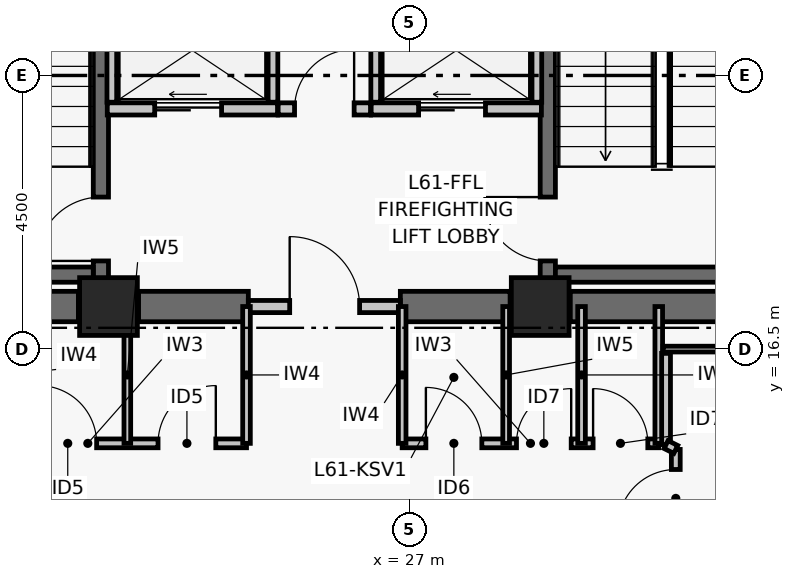
"""IFC4 building model, lengths in metres.
Left out: names, types, materials, properties, quantities, classifications, styles, units other than length and angle.
Written with IfcOpenShell. Run it as: python <this file> out.ifc"""

import sys

from ifc_helpers import new_model, si_unit, direction, frame, frame_2d, origin, origin_2d, place, context, subcontext, project, spatial, rectangle, extrude, element, fill, save


model = new_model("IFC4")
c1 = context("Model", 3, precision=1e-05, world=origin(), true_north=direction((0.0, 1.0)))
c2 = subcontext(c1, "Body", "Model", "MODEL_VIEW")
j1 = project(units=[si_unit("LENGTHUNIT", "METRE"), si_unit("PLANEANGLEUNIT", "RADIAN")], contexts=[c1])
p1 = place(None, origin())
s1 = spatial("IfcSite", under=j1, at=p1, CompositionType="ELEMENT")
p2 = place(p1, origin())
s2 = spatial("IfcBuilding", under=s1, at=p2, CompositionType="ELEMENT")
p3 = place(p2, frame((0.0, 0.0, 242.64)))
s3 = spatial("IfcBuildingStorey", under=s2, at=p3, CompositionType="ELEMENT", Elevation=242.64)
for number, where, z_axis, x_axis in (
    (1, (22.05, 17.2, 0.0), (0.0, 0.0, 1.0), (1.0, 0.0, 0.0)),
    (2, (29.15, 17.2, 0.0), (0.0, 0.0, 1.0), (1.0, 0.0, 0.0)),
):
    element("IfcColumn", number, at=place(p3, frame(where, z_axis=z_axis, x_axis=x_axis)), inside=s3, PredefinedType="COLUMN", context=c2, shape_type="SweptSolid", body=[
        extrude(rectangle(XDim=0.95, YDim=0.95, at=origin_2d()), origin(), (0.0, 0.0, 1.0), 4.5),
    ])
p4 = place(p3, frame((18.295, 17.2, 0.0), z_axis=(0.0, 0.0, 1.0), x_axis=(1.0, 0.0, 0.0)))
e3 = element("IfcWall", 3, at=p4, inside=s3, PredefinedType="SHEAR", context=c2, shape_type="SweptSolid", body=[
    extrude(rectangle(XDim=3.26, YDim=0.5, at=frame_2d((1.63, 0.0))), origin(), (0.0, 0.0, 1.0), 4.28),
])
p5 = place(p3, frame((22.545, 17.2, 0.0), z_axis=(0.0, 0.0, 1.0), x_axis=(1.0, 0.0, 0.0)))
e4 = element("IfcWall", 4, at=p5, inside=s3, PredefinedType="SHEAR", context=c2, shape_type="SweptSolid", body=[
    extrude(rectangle(XDim=1.805, YDim=0.5, at=frame_2d((0.903, 0.0))), origin(), (0.0, 0.0, 1.0), 4.28),
])
p6 = place(p3, frame((26.85, 17.2, 0.0), z_axis=(0.0, 0.0, 1.0), x_axis=(1.0, 0.0, 0.0)))
e5 = element("IfcWall", 5, at=p6, inside=s3, PredefinedType="SHEAR", context=c2, shape_type="SweptSolid", body=[
    extrude(rectangle(XDim=1.805, YDim=0.5, at=frame_2d((0.902, 0.0))), origin(), (0.0, 0.0, 1.0), 4.28),
])
p7 = place(p3, frame((29.645, 17.2, 0.0), z_axis=(0.0, 0.0, 1.0), x_axis=(1.0, 0.0, 0.0)))
e6 = element("IfcWall", 6, at=p7, inside=s3, PredefinedType="SHEAR", context=c2, shape_type="SweptSolid", body=[
    extrude(rectangle(XDim=3.26, YDim=0.5, at=frame_2d((1.63, 0.0))), origin(), (0.0, 0.0, 1.0), 4.28),
])
p8 = place(p3, frame((21.925, 17.6, 0.0), z_axis=(0.0, 0.0, 1.0), x_axis=(0.0, 1.0, 0.0)))
e7 = element("IfcWall", 7, at=p8, inside=s3, PredefinedType="SHEAR", context=c2, shape_type="SweptSolid", body=[
    extrude(rectangle(XDim=8.8, YDim=0.25, at=frame_2d((4.4, 0.0))), origin(), (0.0, 0.0, 1.0), 4.28),
])
p9 = place(p8, frame((0.35, 0.0, 0.0)))
e8 = element("IfcOpeningElement", 8, at=p9, cuts=e7, PredefinedType="OPENING", context=c2, shape_type="SweptSolid", body=[
    extrude(rectangle(XDim=1.05, YDim=2.08, at=frame_2d((0.525, 1.04))), frame((0.0, 0.135, 0.0), z_axis=(0.0, -1.0, 0.0), x_axis=(1.0, 0.0, 0.0)), (0.0, 0.0, 1.0), 0.27),
])
p10 = place(p3, frame((18.304, 17.725, 0.0), z_axis=(0.0, 0.0, 1.0), x_axis=(1.0, 0.0, 0.0)))
e9 = element("IfcWall", 9, at=p10, inside=s3, PredefinedType="SHEAR", context=c2, shape_type="SweptSolid", body=[
    extrude(rectangle(XDim=3.496, YDim=0.25, at=frame_2d((1.748, 0.0))), origin(), (0.0, 0.0, 1.0), 4.28),
])
p11 = place(p3, frame((29.275, 17.6, 0.0), z_axis=(0.0, 0.0, 1.0), x_axis=(0.0, 1.0, 0.0)))
e10 = element("IfcWall", 10, at=p11, inside=s3, PredefinedType="SHEAR", context=c2, shape_type="SweptSolid", body=[
    extrude(rectangle(XDim=8.8, YDim=0.25, at=frame_2d((4.4, 0.0))), origin(), (0.0, 0.0, 1.0), 4.28),
])
p12 = place(p11, frame((0.35, 0.0, 0.0)))
e11 = element("IfcOpeningElement", 11, at=p12, cuts=e10, PredefinedType="OPENING", context=c2, shape_type="SweptSolid", body=[
    extrude(rectangle(XDim=1.05, YDim=2.08, at=frame_2d((0.525, 1.04))), frame((0.0, 0.135, 0.0), z_axis=(0.0, -1.0, 0.0), x_axis=(1.0, 0.0, 0.0)), (0.0, 0.0, 1.0), 0.27),
])
p13 = place(p3, frame((29.4, 17.725, 0.0), z_axis=(0.0, 0.0, 1.0), x_axis=(1.0, 0.0, 0.0)))
e12 = element("IfcWall", 12, at=p13, inside=s3, PredefinedType="SHEAR", context=c2, shape_type="SweptSolid", body=[
    extrude(rectangle(XDim=3.496, YDim=0.25, at=frame_2d((1.748, 0.0))), origin(), (0.0, 0.0, 1.0), 4.28),
])
p14 = place(p3, frame((24.35, 17.2, 0.0), z_axis=(0.0, 0.0, 1.0), x_axis=(1.0, 0.0, 0.0)))
e13 = element("IfcWall", 13, at=p14, inside=s3, PredefinedType="PARTITIONING", context=c2, shape_type="SweptSolid", body=[
    extrude(rectangle(XDim=2.5, YDim=0.2, at=frame_2d((1.25, 0.0))), origin(), (0.0, 0.0, 1.0), 3.41),
])
p15 = place(p14, frame((0.68, 0.0, 0.0)))
e14 = element("IfcOpeningElement", 14, at=p15, cuts=e13, PredefinedType="OPENING", context=c2, shape_type="SweptSolid", body=[
    extrude(rectangle(XDim=1.15, YDim=2.08, at=frame_2d((0.575, 1.04))), frame((0.0, 0.11, 0.0), z_axis=(0.0, -1.0, 0.0), x_axis=(1.0, 0.0, 0.0)), (0.0, 0.0, 1.0), 0.22),
])
p16 = place(p3, frame((24.84, 20.45, 0.0), z_axis=(0.0, 0.0, 1.0), x_axis=(1.0, 0.0, 0.0)))
e15 = element("IfcWall", 15, at=p16, inside=s3, PredefinedType="PARTITIONING", context=c2, shape_type="SweptSolid", body=[
    extrude(rectangle(XDim=1.52, YDim=0.2, at=frame_2d((0.76, 0.0))), origin(), (0.0, 0.0, 1.0), 4.28),
])
p17 = place(p16, frame((0.27, 0.0, 0.0)))
e16 = element("IfcOpeningElement", 16, at=p17, cuts=e15, PredefinedType="OPENING", context=c2, shape_type="SweptSolid", body=[
    extrude(rectangle(XDim=0.98, YDim=2.06, at=frame_2d((0.49, 1.03))), frame((0.0, 0.11, 0.0), z_axis=(0.0, -1.0, 0.0), x_axis=(1.0, 0.0, 0.0)), (0.0, 0.0, 1.0), 0.22),
])
p18 = place(p3, frame((22.03, 20.45, 0.0), z_axis=(0.0, 0.0, 1.0), x_axis=(1.0, 0.0, 0.0)))
e17 = element("IfcWall", 17, at=p18, inside=s3, PredefinedType="PARTITIONING", context=c2, shape_type="SweptSolid", body=[
    extrude(rectangle(XDim=2.8, YDim=0.2, at=frame_2d((1.4, 0.0))), origin(), (0.0, 0.0, 1.0), 4.28),
])
p19 = place(p18, frame((0.78, 0.0, 0.0)))
e18 = element("IfcOpeningElement", 18, at=p19, cuts=e17, PredefinedType="OPENING", context=c2, shape_type="SweptSolid", body=[
    extrude(rectangle(XDim=1.1, YDim=2.08, at=frame_2d((0.55, 1.04))), frame((0.0, 0.11, 0.0), z_axis=(0.0, -1.0, 0.0), x_axis=(1.0, 0.0, 0.0)), (0.0, 0.0, 1.0), 0.22),
])
p20 = place(p3, frame((26.37, 20.45, 0.0), z_axis=(0.0, 0.0, 1.0), x_axis=(1.0, 0.0, 0.0)))
e19 = element("IfcWall", 19, at=p20, inside=s3, PredefinedType="PARTITIONING", context=c2, shape_type="SweptSolid", body=[
    extrude(rectangle(XDim=2.8, YDim=0.2, at=frame_2d((1.4, 0.0))), origin(), (0.0, 0.0, 1.0), 4.28),
])
p21 = place(p20, frame((0.78, 0.0, 0.0)))
e20 = element("IfcOpeningElement", 20, at=p21, cuts=e19, PredefinedType="OPENING", context=c2, shape_type="SweptSolid", body=[
    extrude(rectangle(XDim=1.1, YDim=2.08, at=frame_2d((0.55, 1.04))), frame((0.0, 0.11, 0.0), z_axis=(0.0, -1.0, 0.0), x_axis=(1.0, 0.0, 0.0)), (0.0, 0.0, 1.0), 0.22),
])
for number, where, z_axis, x_axis in (
    (21, (22.105, 20.56, 0.0), (0.0, 0.0, 1.0), (0.0, 1.0, 0.0)),
    (22, (24.755, 20.56, 0.0), (0.0, 0.0, 1.0), (0.0, 1.0, 0.0)),
):
    element("IfcWall", number, at=place(p3, frame(where, z_axis=z_axis, x_axis=x_axis)), inside=s3, PredefinedType="PARTITIONING", context=c2, shape_type="SweptSolid", body=[
        extrude(rectangle(XDim=1.71, YDim=0.16, at=frame_2d((0.855, 0.0))), origin(), (0.0, 0.0, 1.0), 4.28),
    ])
p22 = place(p3, frame((29.095, 20.56, 0.0), z_axis=(0.0, 0.0, 1.0), x_axis=(0.0, 1.0, 0.0)))
e23 = element("IfcWall", 23, at=p22, inside=s3, PredefinedType="PARTITIONING", context=c2, shape_type="SweptSolid", body=[
    extrude(rectangle(XDim=3.58, YDim=0.16, at=frame_2d((1.79, 0.0))), origin(), (0.0, 0.0, 1.0), 4.28),
])
p23 = place(p3, frame((26.445, 20.56, 0.0), z_axis=(0.0, 0.0, 1.0), x_axis=(0.0, 1.0, 0.0)))
e24 = element("IfcWall", 24, at=p23, inside=s3, PredefinedType="PARTITIONING", context=c2, shape_type="SweptSolid", body=[
    extrude(rectangle(XDim=1.71, YDim=0.16, at=frame_2d((0.855, 0.0))), origin(), (0.0, 0.0, 1.0), 4.28),
])
p24 = place(p3, frame((19.1, 14.95, 0.0), z_axis=(0.0, 0.0, 1.0), x_axis=(1.0, 0.0, 0.0)))
e25 = element("IfcWall", 25, at=p24, inside=s3, PredefinedType="PARTITIONING", context=c2, shape_type="SweptSolid", body=[
    extrude(rectangle(XDim=5.22, YDim=0.145, at=frame_2d((2.61, 0.0))), origin(), (0.0, 0.0, 1.0), 3.56),
])
p25 = place(p24, frame((0.2, 0.0, 0.0)))
e26 = element("IfcOpeningElement", 26, at=p25, cuts=e25, PredefinedType="OPENING", context=c2, shape_type="SweptSolid", body=[
    extrude(rectangle(XDim=0.9, YDim=2.02, at=frame_2d((0.45, 1.01))), frame((0.0, 0.083, 0.0), z_axis=(0.0, -1.0, 0.0), x_axis=(1.0, 0.0, 0.0)), (0.0, 0.0, 1.0), 0.165),
])
p26 = place(p24, frame((1.805, 0.0, 0.0)))
e27 = element("IfcOpeningElement", 27, at=p26, cuts=e25, PredefinedType="OPENING", context=c2, shape_type="SweptSolid", body=[
    extrude(rectangle(XDim=0.95, YDim=2.06, at=frame_2d((0.475, 1.03))), frame((0.0, 0.083, 0.0), z_axis=(0.0, -1.0, 0.0), x_axis=(1.0, 0.0, 0.0)), (0.0, 0.0, 1.0), 0.165),
])
p27 = place(p24, frame((3.765, 0.0, 0.0)))
e28 = element("IfcOpeningElement", 28, at=p27, cuts=e25, PredefinedType="OPENING", context=c2, shape_type="SweptSolid", body=[
    extrude(rectangle(XDim=0.95, YDim=2.06, at=frame_2d((0.475, 1.03))), frame((0.0, 0.083, 0.0), z_axis=(0.0, -1.0, 0.0), x_axis=(1.0, 0.0, 0.0)), (0.0, 0.0, 1.0), 0.165),
])
p28 = place(p3, frame((26.88, 14.95, 0.0), z_axis=(0.0, 0.0, 1.0), x_axis=(1.0, 0.0, 0.0)))
e29 = element("IfcWall", 29, at=p28, inside=s3, PredefinedType="PARTITIONING", context=c2, shape_type="SweptSolid", body=[
    extrude(rectangle(XDim=4.22, YDim=0.145, at=frame_2d((2.11, 0.0))), origin(), (0.0, 0.0, 1.0), 3.76),
])
p29 = place(p28, frame((0.39, 0.0, 0.0)))
e30 = element("IfcOpeningElement", 30, at=p29, cuts=e29, PredefinedType="OPENING", context=c2, shape_type="SweptSolid", body=[
    extrude(rectangle(XDim=0.92, YDim=2.05, at=frame_2d((0.46, 1.025))), frame((0.0, 0.083, 0.0), z_axis=(0.0, -1.0, 0.0), x_axis=(1.0, 0.0, 0.0)), (0.0, 0.0, 1.0), 0.165),
])
p30 = place(p28, frame((1.88, 0.0, 0.0)))
e31 = element("IfcOpeningElement", 31, at=p30, cuts=e29, PredefinedType="OPENING", context=c2, shape_type="SweptSolid", body=[
    extrude(rectangle(XDim=0.9, YDim=2.02, at=frame_2d((0.45, 1.01))), frame((0.0, 0.083, 0.0), z_axis=(0.0, -1.0, 0.0), x_axis=(1.0, 0.0, 0.0)), (0.0, 0.0, 1.0), 0.165),
])
p31 = place(p28, frame((3.14, 0.0, 0.0)))
e32 = element("IfcOpeningElement", 32, at=p31, cuts=e29, PredefinedType="OPENING", context=c2, shape_type="SweptSolid", body=[
    extrude(rectangle(XDim=0.9, YDim=2.02, at=frame_2d((0.45, 1.01))), frame((0.0, 0.083, 0.0), z_axis=(0.0, -1.0, 0.0), x_axis=(1.0, 0.0, 0.0)), (0.0, 0.0, 1.0), 0.165),
])
p32 = place(p3, frame((22.36, 14.95, 0.0), z_axis=(0.0, 0.0, 1.0), x_axis=(0.0, 1.0, 0.0)))
e33 = element("IfcWall", 33, at=p32, inside=s3, PredefinedType="PARTITIONING", context=c2, shape_type="SweptSolid", body=[
    extrude(rectangle(XDim=2.25, YDim=0.11, at=frame_2d((1.125, 0.0))), origin(), (0.0, 0.0, 1.0), 3.41),
])
for number, where, z_axis, x_axis in (
    (34, (24.32, 14.95, 0.0), (0.0, 0.0, 1.0), (0.0, 1.0, 0.0)),
    (35, (26.88, 14.95, 0.0), (0.0, 0.0, 1.0), (0.0, 1.0, 0.0)),
):
    element("IfcWall", number, at=place(p3, frame(where, z_axis=z_axis, x_axis=x_axis)), inside=s3, PredefinedType="PARTITIONING", context=c2, shape_type="SweptSolid", body=[
        extrude(rectangle(XDim=2.25, YDim=0.125, at=frame_2d((1.125, 0.0))), origin(), (0.0, 0.0, 1.0), 3.41),
    ])
p33 = place(p3, frame((28.59, 14.95, 0.0), z_axis=(0.0, 0.0, 1.0), x_axis=(0.0, 1.0, 0.0)))
e36 = element("IfcWall", 36, at=p33, inside=s3, PredefinedType="PARTITIONING", context=c2, shape_type="SweptSolid", body=[
    extrude(rectangle(XDim=2.25, YDim=0.11, at=frame_2d((1.125, 0.0))), origin(), (0.0, 0.0, 1.0), 3.41),
])
for number, where, z_axis, x_axis in (
    (37, (29.83, 14.95, 0.0), (0.0, 0.0, 1.0), (0.0, 1.0, 0.0)),
    (38, (31.1, 14.95, 0.0), (0.0, 0.0, 1.0), (0.0, 1.0, 0.0)),
):
    element("IfcWall", number, at=place(p3, frame(where, z_axis=z_axis, x_axis=x_axis)), inside=s3, PredefinedType="PARTITIONING", context=c2, shape_type="SweptSolid", body=[
        extrude(rectangle(XDim=2.25, YDim=0.125, at=frame_2d((1.125, 0.0))), origin(), (0.0, 0.0, 1.0), 3.41),
    ])
p34 = place(p3, frame((31.38, 13.29, 0.0), z_axis=(0.0, 0.0, 1.0), x_axis=(0.0, 1.0, 0.0)))
e39 = element("IfcWall", 39, at=p34, inside=s3, PredefinedType="PARTITIONING", context=c2, shape_type="SweptSolid", body=[
    extrude(rectangle(XDim=1.56, YDim=0.145, at=frame_2d((0.78, 0.0))), origin(), (0.0, 0.0, 1.0), 4.28),
])
p35 = place(p34, frame((0.28, 0.0, 0.0)))
e40 = element("IfcOpeningElement", 40, at=p35, cuts=e39, PredefinedType="OPENING", context=c2, shape_type="SweptSolid", body=[
    extrude(rectangle(XDim=0.95, YDim=2.06, at=frame_2d((0.475, 1.03))), frame((0.0, 0.083, 0.0), z_axis=(0.0, -1.0, 0.0), x_axis=(1.0, 0.0, 0.0)), (0.0, 0.0, 1.0), 0.165),
])
p36 = place(p3, frame((31.22, 14.93, 0.0), z_axis=(0.0, 0.0, 1.0), x_axis=(0.0, 1.0, 0.0)))
e41 = element("IfcWall", 41, at=p36, inside=s3, PredefinedType="PARTITIONING", context=c2, shape_type="SweptSolid", body=[
    extrude(rectangle(XDim=1.5, YDim=0.145, at=frame_2d((0.75, 0.0))), origin(), (0.0, 0.0, 1.0), 3.76),
])
p37 = place(p3, frame((31.17, 16.5, 0.0), z_axis=(0.0, 0.0, 1.0), x_axis=(1.0, 0.0, 0.0)))
e42 = element("IfcWall", 42, at=p37, inside=s3, PredefinedType="PARTITIONING", context=c2, shape_type="SweptSolid", body=[
    extrude(rectangle(XDim=16.534, YDim=0.095, at=frame_2d((8.267, 0.0))), origin(), (0.0, 0.0, 1.0), 3.76),
])
p38 = place(p37, frame((7.807, 0.0, 0.0)))
e43 = element("IfcOpeningElement", 43, at=p38, cuts=e42, PredefinedType="OPENING", context=c2, shape_type="SweptSolid", body=[
    extrude(rectangle(XDim=0.92, YDim=2.05, at=frame_2d((0.46, 1.025))), frame((0.0, 0.057, 0.0), z_axis=(0.0, -1.0, 0.0), x_axis=(1.0, 0.0, 0.0)), (0.0, 0.0, 1.0), 0.115),
])
p39 = place(p3, frame((31.38, 14.85, 0.0), z_axis=(0.0, 0.0, 1.0), x_axis=(-0.89470021502, 0.446667130247, 0.0)))
e44 = element("IfcWall", 44, at=p39, inside=s3, PredefinedType="PARTITIONING", context=c2, shape_type="SweptSolid", body=[
    extrude(rectangle(XDim=0.179, YDim=0.145, at=frame_2d((0.089, 0.0))), origin(), (0.0, 0.0, 1.0), 4.28),
])
p40 = place(p9, origin())
e45 = element("IfcDoor", 45, at=p40, inside=s3, OperationType="SINGLE_SWING_LEFT", PredefinedType="DOOR", context=c2, shape_type="SweptSolid", body=[
    extrude(rectangle(XDim=1.05, YDim=2.08, at=frame_2d((0.525, 1.04))), frame((0.0, 0.025, 0.0), z_axis=(0.0, -1.0, 0.0), x_axis=(1.0, 0.0, 0.0)), (0.0, 0.0, 1.0), 0.05),
])
fill(e8, e45)
p41 = place(p12, origin())
e46 = element("IfcDoor", 46, at=p41, inside=s3, OperationType="SINGLE_SWING_RIGHT", PredefinedType="DOOR", context=c2, shape_type="SweptSolid", body=[
    extrude(rectangle(XDim=1.05, YDim=2.08, at=frame_2d((0.525, 1.04))), frame((0.0, 0.025, 0.0), z_axis=(0.0, -1.0, 0.0), x_axis=(1.0, 0.0, 0.0)), (0.0, 0.0, 1.0), 0.05),
])
fill(e11, e46)
p42 = place(p15, origin())
e47 = element("IfcDoor", 47, at=p42, inside=s3, OperationType="SINGLE_SWING_LEFT", PredefinedType="DOOR", context=c2, shape_type="SweptSolid", body=[
    extrude(rectangle(XDim=1.15, YDim=2.08, at=frame_2d((0.575, 1.04))), frame((0.0, 0.025, 0.0), z_axis=(0.0, -1.0, 0.0), x_axis=(1.0, 0.0, 0.0)), (0.0, 0.0, 1.0), 0.05),
])
fill(e14, e47)
p43 = place(p17, origin())
e48 = element("IfcDoor", 48, at=p43, inside=s3, OperationType="SINGLE_SWING_RIGHT", PredefinedType="DOOR", context=c2, shape_type="SweptSolid", body=[
    extrude(rectangle(XDim=0.98, YDim=2.06, at=frame_2d((0.49, 1.03))), frame((0.0, 0.025, 0.0), z_axis=(0.0, -1.0, 0.0), x_axis=(1.0, 0.0, 0.0)), (0.0, 0.0, 1.0), 0.05),
])
fill(e16, e48)
p44 = place(p19, origin())
e49 = element("IfcDoor", 49, at=p44, inside=s3, OperationType="DOUBLE_DOOR_SLIDING", PredefinedType="DOOR", context=c2, shape_type="SweptSolid", body=[
    extrude(rectangle(XDim=1.1, YDim=2.08, at=frame_2d((0.55, 1.04))), frame((0.0, 0.025, 0.0), z_axis=(0.0, -1.0, 0.0), x_axis=(1.0, 0.0, 0.0)), (0.0, 0.0, 1.0), 0.05),
])
fill(e18, e49)
p45 = place(p21, origin())
e50 = element("IfcDoor", 50, at=p45, inside=s3, OperationType="DOUBLE_DOOR_SLIDING", PredefinedType="DOOR", context=c2, shape_type="SweptSolid", body=[
    extrude(rectangle(XDim=1.1, YDim=2.08, at=frame_2d((0.55, 1.04))), frame((0.0, 0.025, 0.0), z_axis=(0.0, -1.0, 0.0), x_axis=(1.0, 0.0, 0.0)), (0.0, 0.0, 1.0), 0.05),
])
fill(e20, e50)
p46 = place(p26, origin())
e51 = element("IfcDoor", 51, at=p46, inside=s3, OperationType="SINGLE_SWING_LEFT", PredefinedType="DOOR", context=c2, shape_type="SweptSolid", body=[
    extrude(rectangle(XDim=0.95, YDim=2.06, at=frame_2d((0.475, 1.03))), frame((0.0, 0.025, 0.0), z_axis=(0.0, -1.0, 0.0), x_axis=(1.0, 0.0, 0.0)), (0.0, 0.0, 1.0), 0.05),
])
fill(e27, e51)
p47 = place(p27, origin())
e52 = element("IfcDoor", 52, at=p47, inside=s3, OperationType="SINGLE_SWING_RIGHT", PredefinedType="DOOR", context=c2, shape_type="SweptSolid", body=[
    extrude(rectangle(XDim=0.95, YDim=2.06, at=frame_2d((0.475, 1.03))), frame((0.0, 0.025, 0.0), z_axis=(0.0, -1.0, 0.0), x_axis=(1.0, 0.0, 0.0)), (0.0, 0.0, 1.0), 0.05),
])
fill(e28, e52)
p48 = place(p29, origin())
e53 = element("IfcDoor", 53, at=p48, inside=s3, OperationType="SINGLE_SWING_LEFT", PredefinedType="DOOR", context=c2, shape_type="SweptSolid", body=[
    extrude(rectangle(XDim=0.92, YDim=2.05, at=frame_2d((0.46, 1.025))), frame((0.0, 0.025, 0.0), z_axis=(0.0, -1.0, 0.0), x_axis=(1.0, 0.0, 0.0)), (0.0, 0.0, 1.0), 0.05),
])
fill(e30, e53)
p49 = place(p30, origin())
e54 = element("IfcDoor", 54, at=p49, inside=s3, OperationType="SINGLE_SWING_RIGHT", PredefinedType="DOOR", context=c2, shape_type="SweptSolid", body=[
    extrude(rectangle(XDim=0.9, YDim=2.02, at=frame_2d((0.45, 1.01))), frame((0.0, 0.025, 0.0), z_axis=(0.0, -1.0, 0.0), x_axis=(1.0, 0.0, 0.0)), (0.0, 0.0, 1.0), 0.05),
])
fill(e31, e54)
p50 = place(p31, origin())
e55 = element("IfcDoor", 55, at=p50, inside=s3, OperationType="SINGLE_SWING_LEFT", PredefinedType="DOOR", context=c2, shape_type="SweptSolid", body=[
    extrude(rectangle(XDim=0.9, YDim=2.02, at=frame_2d((0.45, 1.01))), frame((0.0, 0.025, 0.0), z_axis=(0.0, -1.0, 0.0), x_axis=(1.0, 0.0, 0.0)), (0.0, 0.0, 1.0), 0.05),
])
fill(e32, e55)
p51 = place(p35, origin())
e56 = element("IfcDoor", 56, at=p51, inside=s3, OperationType="SINGLE_SWING_LEFT", PredefinedType="DOOR", context=c2, shape_type="SweptSolid", body=[
    extrude(rectangle(XDim=0.95, YDim=2.06, at=frame_2d((0.475, 1.03))), frame((0.0, 0.025, 0.0), z_axis=(0.0, -1.0, 0.0), x_axis=(1.0, 0.0, 0.0)), (0.0, 0.0, 1.0), 0.05),
])
fill(e40, e56)
save(model, sys.argv[1])
